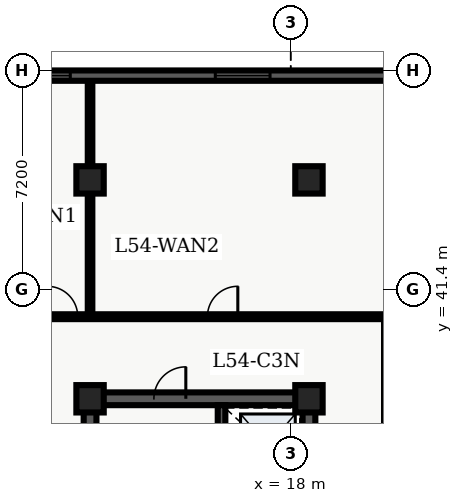
"""IFC4 building model, lengths in metres.
Left out: names, types, materials, properties, quantities, classifications, styles, units other than length and angle.
Written with IfcOpenShell. Run it as: python <this file> out.ifc"""

import sys

from ifc_helpers import new_model, entity, si_unit, converted_unit, direction, frame, origin_with_axes, origin_2d_with_axis, place, context, subcontext, project, spatial, polyline, rectangle, outline, extrude, element, fill, save


model = new_model("IFC4")
c1 = context("Model", 3, precision=1e-05, world=origin_with_axes(), true_north=direction((0.0, 1.0)))
c2 = subcontext(c1, "Body", "Model", "MODEL_VIEW")
j1 = project(units=[si_unit("LENGTHUNIT", "METRE"), converted_unit("PLANEANGLEUNIT", "DEGREE", entity("IfcPlaneAngleMeasure", 0.017), si_unit("PLANEANGLEUNIT", "RADIAN"), dimensions=[0, 0, 0, 0, 0, 0, 0])], contexts=[c1])
p1 = place(None, origin_with_axes())
s1 = spatial("IfcSite", under=j1, at=p1, CompositionType="ELEMENT")
p2 = place(p1, origin_with_axes())
s2 = spatial("IfcBuilding", under=s1, at=p2, CompositionType="ELEMENT")
p3 = place(p2, frame((0.0, 0.0, 219.9), z_axis=(0.0, 0.0, 1.0), x_axis=(1.0, 0.0, 0.0)))
s3 = spatial("IfcBuildingStorey", under=s2, at=p3, CompositionType="ELEMENT", Elevation=219.9)
p4 = place(p3, frame((11.4, 10.8, 0.0), z_axis=(0.0, 0.0, 1.0), x_axis=(0.0, 1.0, 0.0)))
e1 = element("IfcWall", 1, at=p4, inside=s3, PredefinedType="SHEAR", context=c2, shape_type="SweptSolid", body=[
    extrude(outline(polyline([(0.0, -0.21), (27.0, -0.21), (27.0, 0.21), (0.0, 0.21), (0.0, -0.21)])), origin_with_axes(), (0.0, 0.0, 1.0), 4.56),
])
p5 = place(p3, frame((11.4, 37.8, 0.0), z_axis=(0.0, 0.0, 1.0), x_axis=(1.0, 0.0, 0.0)))
e2 = element("IfcWall", 2, at=p5, inside=s3, PredefinedType="SHEAR", context=c2, shape_type="SweptSolid", body=[
    extrude(outline(polyline([(0.0, -0.21), (7.2, -0.21), (7.2, 0.21), (0.0, 0.21), (0.0, -0.21)])), origin_with_axes(), (0.0, 0.0, 1.0), 4.56),
])
p6 = place(p5, frame((2.625, 0.0, 0.0), z_axis=(0.0, 0.0, 1.0), x_axis=(1.0, 0.0, 0.0)))
e3 = element("IfcOpeningElement", 3, at=p6, cuts=e2, PredefinedType="OPENING", context=c2, shape_type="SweptSolid", body=[
    extrude(rectangle(XDim=1.05, YDim=0.44, at=origin_2d_with_axis()), origin_with_axes(), (0.0, 0.0, 1.0), 2.15),
])
p7 = place(p3, frame((18.6, 24.3, 0.0), z_axis=(0.0, 0.0, 1.0), x_axis=(0.0, 1.0, 0.0)))
e4 = element("IfcWall", 4, at=p7, inside=s3, PredefinedType="SHEAR", context=c2, shape_type="SweptSolid", body=[
    extrude(outline(polyline([(0.0, -0.21), (13.5, -0.21), (13.5, 0.21), (0.0, 0.21), (0.0, -0.21)])), origin_with_axes(), (0.0, 0.0, 1.0), 4.56),
])
p8 = place(p7, frame((5.65, 0.0, 0.0), z_axis=(0.0, 0.0, 1.0), x_axis=(1.0, 0.0, 0.0)))
e5 = element("IfcOpeningElement", 5, at=p8, cuts=e4, PredefinedType="OPENING", context=c2, shape_type="SweptSolid", body=[
    extrude(rectangle(XDim=1.1, YDim=0.44, at=origin_2d_with_axis()), origin_with_axes(), (0.0, 0.0, 1.0), 2.15),
])
p9 = place(p7, frame((7.75, 0.0, 0.0), z_axis=(0.0, 0.0, 1.0), x_axis=(1.0, 0.0, 0.0)))
e6 = element("IfcOpeningElement", 6, at=p9, cuts=e4, PredefinedType="OPENING", context=c2, shape_type="SweptSolid", body=[
    extrude(rectangle(XDim=1.1, YDim=0.44, at=origin_2d_with_axis()), origin_with_axes(), (0.0, 0.0, 1.0), 2.15),
])
p10 = place(p7, frame((9.85, 0.0, 0.0), z_axis=(0.0, 0.0, 1.0), x_axis=(1.0, 0.0, 0.0)))
e7 = element("IfcOpeningElement", 7, at=p10, cuts=e4, PredefinedType="OPENING", context=c2, shape_type="SweptSolid", body=[
    extrude(rectangle(XDim=1.1, YDim=0.44, at=origin_2d_with_axis()), origin_with_axes(), (0.0, 0.0, 1.0), 2.15),
])
p11 = place(p7, frame((11.95, 0.0, 0.0), z_axis=(0.0, 0.0, 1.0), x_axis=(1.0, 0.0, 0.0)))
e8 = element("IfcOpeningElement", 8, at=p11, cuts=e4, PredefinedType="OPENING", context=c2, shape_type="SweptSolid", body=[
    extrude(rectangle(XDim=1.1, YDim=0.44, at=origin_2d_with_axis()), origin_with_axes(), (0.0, 0.0, 1.0), 2.15),
])
p12 = place(p3, frame((15.725, 28.9, 0.0), z_axis=(0.0, 0.0, 1.0), x_axis=(0.0, 1.0, 0.0)))
e9 = element("IfcWall", 9, at=p12, inside=s3, PredefinedType="SHEAR", context=c2, shape_type="SweptSolid", body=[
    extrude(outline(polyline([(0.0, -0.125), (8.69, -0.125), (8.69, 0.125), (0.0, 0.125), (0.0, -0.125)])), origin_with_axes(), (0.0, 0.0, 1.0), 4.56),
])
for number, where, z_axis, x_axis in (
    (10, (11.4, 37.8, 0.0), (0.0, 0.0, 1.0), (1.0, 0.0, 0.0)),
    (11, (11.4, 45.0, 0.0), (0.0, 0.0, 1.0), (1.0, 0.0, 0.0)),
    (12, (18.6, 37.8, 0.0), (0.0, 0.0, 1.0), (1.0, 0.0, 0.0)),
    (13, (18.6, 45.0, 0.0), (0.0, 0.0, 1.0), (1.0, 0.0, 0.0)),
):
    element("IfcColumn", number, at=place(p3, frame(where, z_axis=z_axis, x_axis=x_axis)), inside=s3, PredefinedType="COLUMN", context=c2, shape_type="SweptSolid", body=[
        extrude(rectangle(XDim=0.9, YDim=0.9, at=origin_2d_with_axis()), origin_with_axes(), (0.0, 0.0, 1.0), 4.8),
    ])
p13 = place(p3, frame((7.1, 40.5, 0.0), z_axis=(0.0, 0.0, 1.0), x_axis=(1.0, 0.0, 0.0)))
e14 = element("IfcWall", 14, at=p13, inside=s3, PredefinedType="PARTITIONING", context=c2, shape_type="SweptSolid", body=[
    extrude(outline(polyline([(0.0, -0.08), (24.965, -0.08), (24.965, 0.08), (0.0, 0.08), (0.0, -0.08)])), origin_with_axes(), (0.0, 0.0, 1.0), 3.2),
])
p14 = place(p13, frame((3.395, 0.0, 0.0), z_axis=(0.0, 0.0, 1.0), x_axis=(1.0, 0.0, 0.0)))
e15 = element("IfcOpeningElement", 15, at=p14, cuts=e14, PredefinedType="OPENING", context=c2, shape_type="SweptSolid", body=[
    extrude(rectangle(XDim=1.0, YDim=0.18, at=origin_2d_with_axis()), origin_with_axes(), (0.0, 0.0, 1.0), 2.15),
])
p15 = place(p13, frame((8.66, 0.0, 0.0), z_axis=(0.0, 0.0, 1.0), x_axis=(1.0, 0.0, 0.0)))
e16 = element("IfcOpeningElement", 16, at=p15, cuts=e14, PredefinedType="OPENING", context=c2, shape_type="SweptSolid", body=[
    extrude(rectangle(XDim=1.0, YDim=0.18, at=origin_2d_with_axis()), origin_with_axes(), (0.0, 0.0, 1.0), 2.15),
])
p16 = place(p3, frame((11.4, 40.6, 0.0), z_axis=(0.0, 0.0, 1.0), x_axis=(0.0, 1.0, 0.0)))
e17 = element("IfcWall", 17, at=p16, inside=s3, PredefinedType="PARTITIONING", context=c2, shape_type="SweptSolid", body=[
    extrude(outline(polyline([(0.0, -0.075), (7.665, -0.075), (7.665, 0.075), (0.0, 0.075), (0.0, -0.075)])), origin_with_axes(), (0.0, 0.0, 1.0), 3.2),
])
p17 = place(p3, frame((7.24, 48.43, 0.0), z_axis=(0.0, 0.0, 1.0), x_axis=(1.0, 0.0, 0.0)))
e18 = element("IfcWall", 18, at=p17, inside=s3, PredefinedType="SOLIDWALL", context=c2, shape_type="SweptSolid", body=[
    extrude(outline(polyline([(0.0, -0.17), (18.36, -0.17), (18.36, 0.17), (0.0, 0.17), (0.0, -0.17)])), origin_with_axes(), (0.0, 0.0, 1.0), 4.56),
])
p18 = place(p17, frame((2.61, 0.0, 0.45), z_axis=(0.0, 0.0, 1.0), x_axis=(1.0, 0.0, 0.0)))
e19 = element("IfcOpeningElement", 19, at=p18, cuts=e18, PredefinedType="OPENING", context=c2, shape_type="SweptSolid", body=[
    extrude(rectangle(XDim=1.8, YDim=0.36, at=origin_2d_with_axis()), origin_with_axes(), (0.0, 0.0, 1.0), 2.1),
])
p19 = place(p17, frame((9.18, 0.0, 0.45), z_axis=(0.0, 0.0, 1.0), x_axis=(1.0, 0.0, 0.0)))
e20 = element("IfcOpeningElement", 20, at=p19, cuts=e18, PredefinedType="OPENING", context=c2, shape_type="SweptSolid", body=[
    extrude(rectangle(XDim=1.8, YDim=0.36, at=origin_2d_with_axis()), origin_with_axes(), (0.0, 0.0, 1.0), 2.1),
])
p20 = place(p17, frame((14.9, 0.0, 0.45), z_axis=(0.0, 0.0, 1.0), x_axis=(1.0, 0.0, 0.0)))
e21 = element("IfcOpeningElement", 21, at=p20, cuts=e18, PredefinedType="OPENING", context=c2, shape_type="SweptSolid", body=[
    extrude(rectangle(XDim=1.8, YDim=0.36, at=origin_2d_with_axis()), origin_with_axes(), (0.0, 0.0, 1.0), 2.1),
])
p21 = place(p5, frame((2.625, 0.0, 0.0), z_axis=(0.0, 0.0, 1.0), x_axis=(1.0, 0.0, 0.0)))
e22 = element("IfcDoor", 22, at=p21, inside=s3, OperationType="SINGLE_SWING_RIGHT", PredefinedType="DOOR", context=c2, shape_type="SweptSolid", body=[
    extrude(rectangle(XDim=1.05, YDim=0.09, at=origin_2d_with_axis()), origin_with_axes(), (0.0, 0.0, 1.0), 2.15),
])
fill(e3, e22)
p22 = place(p13, frame((3.395, 0.0, 0.0), z_axis=(0.0, 0.0, 1.0), x_axis=(1.0, 0.0, 0.0)))
e23 = element("IfcDoor", 23, at=p22, inside=s3, OperationType="SINGLE_SWING_LEFT", PredefinedType="DOOR", context=c2, shape_type="SweptSolid", body=[
    extrude(rectangle(XDim=1.0, YDim=0.09, at=origin_2d_with_axis()), origin_with_axes(), (0.0, 0.0, 1.0), 2.15),
])
fill(e15, e23)
p23 = place(p13, frame((8.66, 0.0, 0.0), z_axis=(0.0, 0.0, 1.0), x_axis=(1.0, 0.0, 0.0)))
e24 = element("IfcDoor", 24, at=p23, inside=s3, OperationType="SINGLE_SWING_RIGHT", PredefinedType="DOOR", context=c2, shape_type="SweptSolid", body=[
    extrude(rectangle(XDim=1.0, YDim=0.09, at=origin_2d_with_axis()), origin_with_axes(), (0.0, 0.0, 1.0), 2.15),
])
fill(e16, e24)
p24 = place(p17, frame((2.61, 0.0, 0.45), z_axis=(0.0, 0.0, 1.0), x_axis=(1.0, 0.0, 0.0)))
e25 = element("IfcWindow", 25, at=p24, inside=s3, PredefinedType="WINDOW", context=c2, shape_type="SweptSolid", body=[
    extrude(rectangle(XDim=1.8, YDim=0.09, at=origin_2d_with_axis()), origin_with_axes(), (0.0, 0.0, 1.0), 2.1),
])
fill(e19, e25)
p25 = place(p17, frame((9.18, 0.0, 0.45), z_axis=(0.0, 0.0, 1.0), x_axis=(1.0, 0.0, 0.0)))
e26 = element("IfcWindow", 26, at=p25, inside=s3, PredefinedType="WINDOW", context=c2, shape_type="SweptSolid", body=[
    extrude(rectangle(XDim=1.8, YDim=0.09, at=origin_2d_with_axis()), origin_with_axes(), (0.0, 0.0, 1.0), 2.1),
])
fill(e20, e26)
save(model, sys.argv[1])
